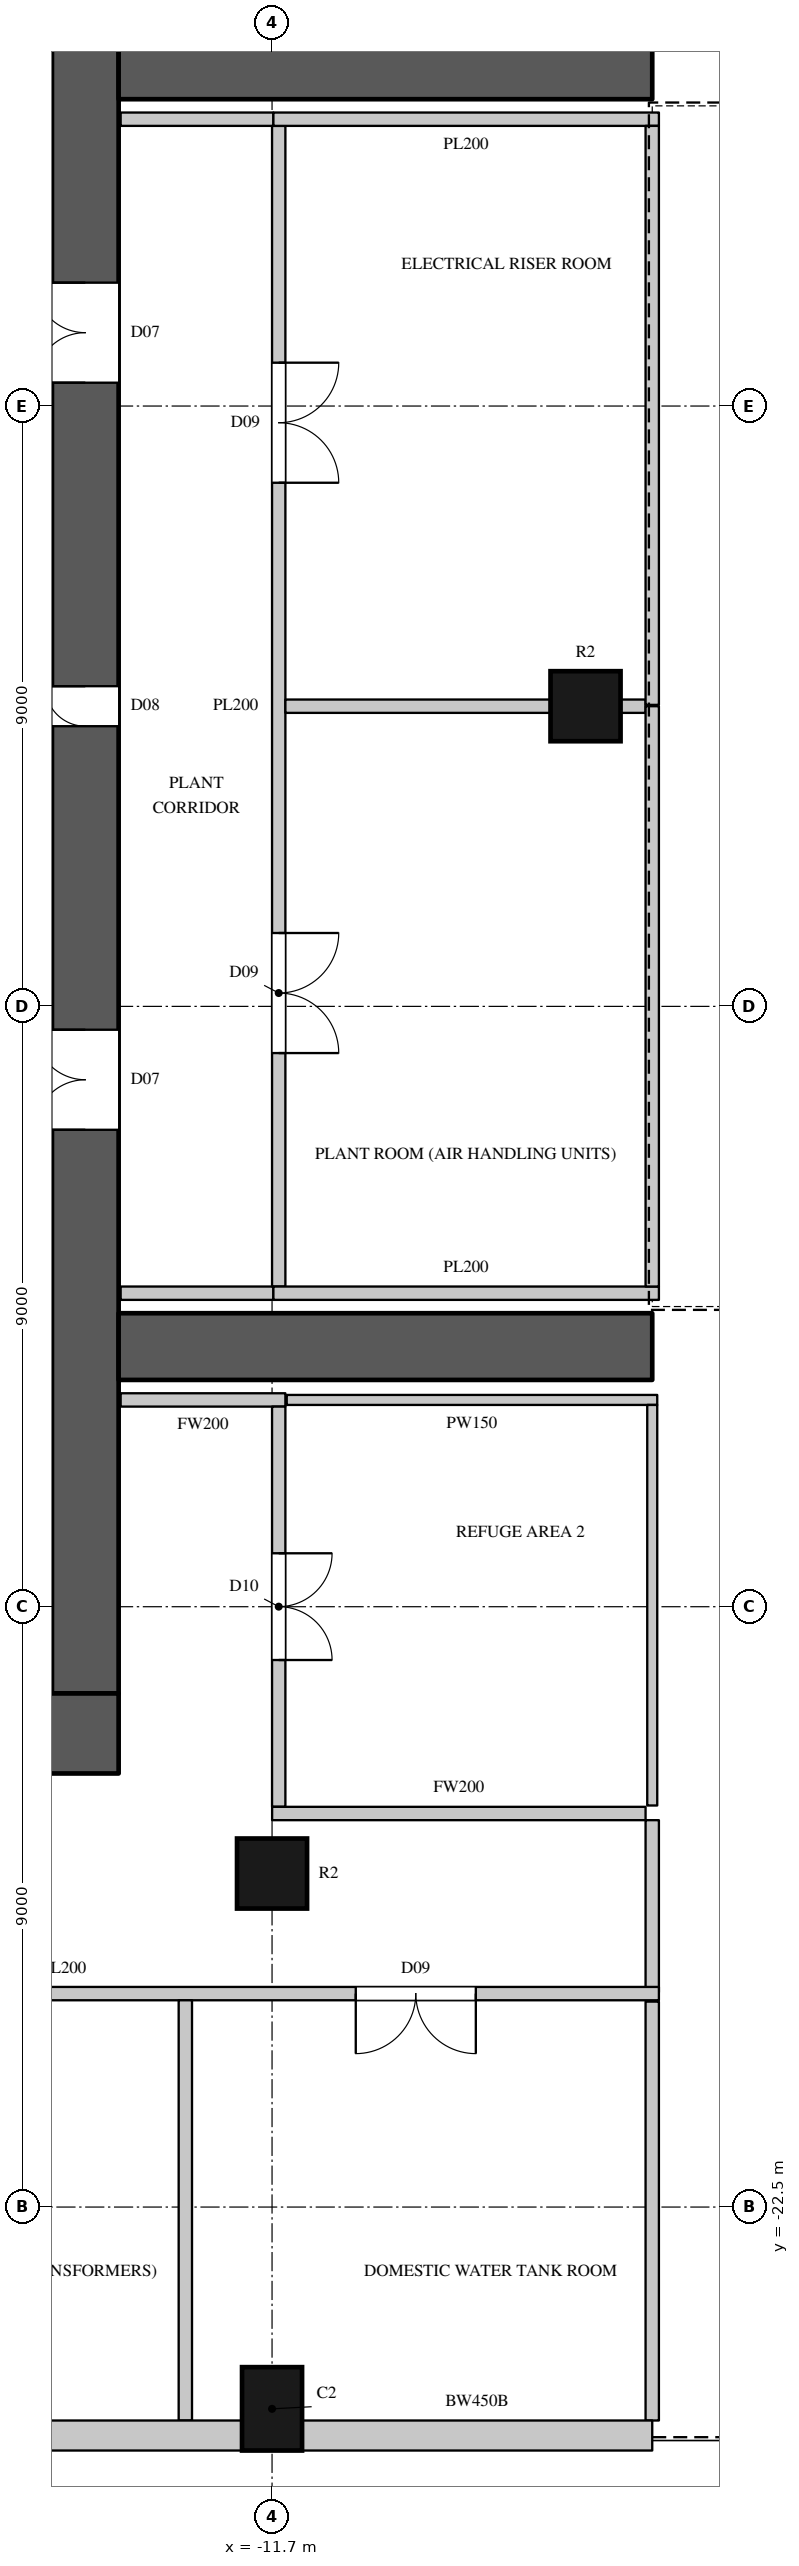
"""IFC4 building model, lengths in metres.
Left out: names, types, materials, properties, quantities, classifications, styles, units other than length and angle.
Written with IfcOpenShell. Run it as: python <this file> out.ifc"""

import sys

from ifc_helpers import new_model, si_unit, direction, frame, frame_2d, origin, origin_2d, place, context, subcontext, project, spatial, rectangle, circle, extrude, element, fill, save


model = new_model("IFC4")
c1 = context("Model", 3, precision=1e-05, world=origin(), true_north=direction((0.0, 1.0)))
c2 = subcontext(c1, "Body", "Model", "MODEL_VIEW")
j1 = project(units=[si_unit("LENGTHUNIT", "METRE"), si_unit("PLANEANGLEUNIT", "RADIAN")], contexts=[c1])
p1 = place(None, origin())
s1 = spatial("IfcSite", under=j1, at=p1, CompositionType="ELEMENT")
p2 = place(p1, origin())
s2 = spatial("IfcBuilding", under=s1, at=p2, CompositionType="ELEMENT")
p3 = place(p2, frame((0.0, 0.0, 152.5)))
s3 = spatial("IfcBuildingStorey", under=s2, at=p3, CompositionType="ELEMENT", Elevation=152.5)
p4 = place(p3, frame((-11.7, -25.525, 0.0), z_axis=(0.0, 0.0, 1.0), x_axis=(1.0, 0.0, 0.0)))
e1 = element("IfcColumn", 1, at=p4, inside=s3, PredefinedType="COLUMN", context=c2, shape_type="SweptSolid", body=[
    extrude(rectangle(XDim=0.9, YDim=1.25, at=origin_2d()), origin(), (0.0, 0.0, 1.0), 8.0),
])
for number, where, z_axis, x_axis in (
    (2, (-11.7, -17.5, 0.0), (0.0, 0.0, 1.0), (1.0, 0.0, 0.0)),
    (3, (-7.0, 0.0, 0.0), (0.0, 0.0, 1.0), (1.0, 0.0, 0.0)),
):
    element("IfcColumn", number, at=place(p3, frame(where, z_axis=z_axis, x_axis=x_axis)), inside=s3, PredefinedType="COLUMN", context=c2, shape_type="SweptSolid", body=[
        extrude(circle(Radius=0.525, at=origin_2d()), origin(), (0.0, 0.0, 1.0), 8.0),
    ])
for number, where, z_axis, x_axis in (
    (4, (-14.0, -9.6, 0.0), (0.0, 0.0, 1.0), (1.0, 0.0, 0.0)),
    (5, (-14.0, 9.6, 0.0), (0.0, 0.0, 1.0), (1.0, 0.0, 0.0)),
):
    element("IfcWall", number, at=place(p3, frame(where, z_axis=z_axis, x_axis=x_axis)), inside=s3, PredefinedType="SOLIDWALL", context=c2, shape_type="SweptSolid", body=[
        extrude(rectangle(XDim=8.0, YDim=1.0, at=frame_2d((4.0, 0.0))), origin(), (0.0, 0.0, 1.0), 7.7),
    ])
p5 = place(p3, frame((-20.25, -25.925, 0.0), z_axis=(0.0, 0.0, 1.0), x_axis=(1.0, 0.0, 0.0)))
e6 = element("IfcWall", 6, at=p5, inside=s3, PredefinedType="SOLIDWALL", context=c2, shape_type="SweptSolid", body=[
    extrude(rectangle(XDim=8.1, YDim=0.45, at=frame_2d((4.05, 0.0))), origin(), (0.0, 0.0, 1.0), 7.7),
])
p6 = place(p3, frame((-11.25, -25.925, 0.0), z_axis=(0.0, 0.0, 1.0), x_axis=(1.0, 0.0, 0.0)))
e7 = element("IfcWall", 7, at=p6, inside=s3, PredefinedType="SOLIDWALL", context=c2, shape_type="SweptSolid", body=[
    extrude(rectangle(XDim=5.25, YDim=0.45, at=frame_2d((2.625, 0.0))), origin(), (0.0, 0.0, 1.0), 4.7),
])
p7 = place(p3, frame((-30.0, -15.4, 0.0), z_axis=(0.0, 0.0, 1.0), x_axis=(1.0, 0.0, 0.0)))
e8 = element("IfcWall", 8, at=p7, inside=s3, PredefinedType="SHEAR", context=c2, shape_type="SweptSolid", body=[
    extrude(rectangle(XDim=16.0, YDim=1.2, at=frame_2d((8.0, 0.0))), origin(), (0.0, 0.0, 1.0), 8.0),
])
p8 = place(p7, frame((13.4, 0.0, 0.0)))
e9 = element("IfcOpeningElement", 9, at=p8, cuts=e8, PredefinedType="OPENING", context=c2, shape_type="SweptSolid", body=[
    extrude(rectangle(XDim=1.5, YDim=2.4, at=frame_2d((0.75, 1.2))), frame((0.0, 0.61, 0.0), z_axis=(0.0, -1.0, 0.0), x_axis=(1.0, 0.0, 0.0)), (0.0, 0.0, 1.0), 1.22),
])
p9 = place(p3, frame((-14.5, -14.8, 0.0), z_axis=(0.0, 0.0, 1.0), x_axis=(0.0, 1.0, 0.0)))
e10 = element("IfcWall", 10, at=p9, inside=s3, PredefinedType="SHEAR", context=c2, shape_type="SweptSolid", body=[
    extrude(rectangle(XDim=29.6, YDim=1.0, at=frame_2d((14.8, 0.0))), origin(), (0.0, 0.0, 1.0), 8.0),
])
p10 = place(p9, frame((8.45, 0.0, 0.0)))
e11 = element("IfcOpeningElement", 11, at=p10, cuts=e10, PredefinedType="OPENING", context=c2, shape_type="SweptSolid", body=[
    extrude(rectangle(XDim=1.5, YDim=2.4, at=frame_2d((0.75, 1.2))), frame((0.0, 0.51, 0.0), z_axis=(0.0, -1.0, 0.0), x_axis=(1.0, 0.0, 0.0)), (0.0, 0.0, 1.0), 1.02),
])
p11 = place(p9, frame((19.65, 0.0, 0.0)))
e12 = element("IfcOpeningElement", 12, at=p11, cuts=e10, PredefinedType="OPENING", context=c2, shape_type="SweptSolid", body=[
    extrude(rectangle(XDim=1.5, YDim=2.4, at=frame_2d((0.75, 1.2))), frame((0.0, 0.51, 0.0), z_axis=(0.0, -1.0, 0.0), x_axis=(1.0, 0.0, 0.0)), (0.0, 0.0, 1.0), 1.02),
])
p12 = place(p9, frame((14.5, 0.0, 0.0)))
e13 = element("IfcOpeningElement", 13, at=p12, cuts=e10, PredefinedType="OPENING", context=c2, shape_type="SweptSolid", body=[
    extrude(rectangle(XDim=0.6, YDim=2.0, at=frame_2d((0.3, 1.0))), frame((0.0, 0.51, 0.0), z_axis=(0.0, -1.0, 0.0), x_axis=(1.0, 0.0, 0.0)), (0.0, 0.0, 1.0), 1.02),
])
p13 = place(p3, frame((-13.97, -10.4, 0.0), z_axis=(0.0, 0.0, 1.0), x_axis=(1.0, 0.0, 0.0)))
e14 = element("IfcWall", 14, at=p13, inside=s3, PredefinedType="PARTITIONING", context=c2, shape_type="SweptSolid", body=[
    extrude(rectangle(XDim=2.47, YDim=0.2, at=frame_2d((1.235, 0.0))), origin(), (0.0, 0.0, 1.0), 7.7),
])
for number, where, z_axis, x_axis in (
    (15, (-13.97, -8.8, 0.0), (0.0, 0.0, 1.0), (1.0, 0.0, 0.0)),
    (16, (-13.97, 8.8, 0.0), (0.0, 0.0, 1.0), (1.0, 0.0, 0.0)),
):
    element("IfcWall", number, at=place(p3, frame(where, z_axis=z_axis, x_axis=x_axis)), inside=s3, PredefinedType="PARTITIONING", context=c2, shape_type="SweptSolid", body=[
        extrude(rectangle(XDim=2.29, YDim=0.2, at=frame_2d((1.145, 0.0))), origin(), (0.0, 0.0, 1.0), 7.7),
    ])
p14 = place(p3, frame((-11.6, -16.499, 0.0), z_axis=(0.0, 0.0, 1.0), x_axis=(0.0, 1.0, 0.0)))
e17 = element("IfcWall", 17, at=p14, inside=s3, PredefinedType="PARTITIONING", context=c2, shape_type="SweptSolid", body=[
    extrude(rectangle(XDim=5.999, YDim=0.2, at=frame_2d((3.0, 0.0))), origin(), (0.0, 0.0, 1.0), 6.4),
])
p15 = place(p14, frame((2.2, 0.0, 0.0)))
e18 = element("IfcOpeningElement", 18, at=p15, cuts=e17, PredefinedType="OPENING", context=c2, shape_type="SweptSolid", body=[
    extrude(rectangle(XDim=1.6, YDim=2.4, at=frame_2d((0.8, 1.2))), frame((0.0, 0.11, 0.0), z_axis=(0.0, -1.0, 0.0), x_axis=(1.0, 0.0, 0.0)), (0.0, 0.0, 1.0), 0.22),
])
p16 = place(p3, frame((-11.699, -16.6, 0.0), z_axis=(0.0, 0.0, 1.0), x_axis=(1.0, 0.0, 0.0)))
e19 = element("IfcWall", 19, at=p16, inside=s3, PredefinedType="PARTITIONING", context=c2, shape_type="SweptSolid", body=[
    extrude(rectangle(XDim=5.599, YDim=0.2, at=frame_2d((2.799, 0.0))), origin(), (0.0, 0.0, 1.0), 5.85),
])
p17 = place(p3, frame((-6.0, -19.28, 0.0), z_axis=(0.0, 0.0, 1.0), x_axis=(0.0, 1.0, 0.0)))
e20 = element("IfcWall", 20, at=p17, inside=s3, PredefinedType="PARTITIONING", context=c2, shape_type="SweptSolid", body=[
    extrude(rectangle(XDim=2.58, YDim=0.2, at=frame_2d((1.29, 0.0))), origin(), (0.0, 0.0, 1.0), 7.7),
])
p18 = place(p3, frame((-11.48, -10.4, 0.0), z_axis=(0.0, 0.0, 1.0), x_axis=(1.0, 0.0, 0.0)))
e21 = element("IfcWall", 21, at=p18, inside=s3, PredefinedType="PARTITIONING", context=c2, shape_type="SweptSolid", body=[
    extrude(rectangle(XDim=5.555, YDim=0.15, at=frame_2d((2.777, 0.0))), origin(), (0.0, 0.0, 1.0), 7.7),
])
p19 = place(p3, frame((-6.0, -16.48, 0.0), z_axis=(0.0, 0.0, 1.0), x_axis=(0.0, 1.0, 0.0)))
e22 = element("IfcWall", 22, at=p19, inside=s3, PredefinedType="PARTITIONING", context=c2, shape_type="SweptSolid", body=[
    extrude(rectangle(XDim=6.005, YDim=0.15, at=frame_2d((3.002, 0.0))), origin(), (0.0, 0.0, 1.0), 7.7),
])
p20 = place(p3, frame((-23.745, -19.3, 0.0), z_axis=(0.0, 0.0, 1.0), x_axis=(1.0, 0.0, 0.0)))
e23 = element("IfcWall", 23, at=p20, inside=s3, PredefinedType="PARTITIONING", context=c2, shape_type="SweptSolid", body=[
    extrude(rectangle(XDim=17.845, YDim=0.2, at=frame_2d((8.922, 0.0))), origin(), (0.0, 0.0, 1.0), 7.25),
])
p21 = place(p20, frame((1.0, 0.0, 0.0)))
e24 = element("IfcOpeningElement", 24, at=p21, cuts=e23, PredefinedType="OPENING", context=c2, shape_type="SweptSolid", body=[
    extrude(rectangle(XDim=1.8, YDim=2.4, at=frame_2d((0.9, 1.2))), frame((0.0, 0.11, 0.0), z_axis=(0.0, -1.0, 0.0), x_axis=(1.0, 0.0, 0.0)), (0.0, 0.0, 1.0), 0.22),
])
p22 = place(p20, frame((6.3, 0.0, 0.0)))
e25 = element("IfcOpeningElement", 25, at=p22, cuts=e23, PredefinedType="OPENING", context=c2, shape_type="SweptSolid", body=[
    extrude(rectangle(XDim=1.8, YDim=2.4, at=frame_2d((0.9, 1.2))), frame((0.0, 0.11, 0.0), z_axis=(0.0, -1.0, 0.0), x_axis=(1.0, 0.0, 0.0)), (0.0, 0.0, 1.0), 0.22),
])
p23 = place(p20, frame((13.3, 0.0, 0.0)))
e26 = element("IfcOpeningElement", 26, at=p23, cuts=e23, PredefinedType="OPENING", context=c2, shape_type="SweptSolid", body=[
    extrude(rectangle(XDim=1.8, YDim=2.4, at=frame_2d((0.9, 1.2))), frame((0.0, 0.11, 0.0), z_axis=(0.0, -1.0, 0.0), x_axis=(1.0, 0.0, 0.0)), (0.0, 0.0, 1.0), 0.22),
])
p24 = place(p3, frame((-13.0, -25.7, 0.0), z_axis=(0.0, 0.0, 1.0), x_axis=(0.0, 1.0, 0.0)))
e27 = element("IfcWall", 27, at=p24, inside=s3, PredefinedType="PARTITIONING", context=c2, shape_type="SweptSolid", body=[
    extrude(rectangle(XDim=6.3, YDim=0.2, at=frame_2d((3.15, 0.0))), origin(), (0.0, 0.0, 1.0), 7.7),
])
p25 = place(p3, frame((-11.6, -8.7, 0.0), z_axis=(0.0, 0.0, 1.0), x_axis=(0.0, 1.0, 0.0)))
e28 = element("IfcWall", 28, at=p25, inside=s3, PredefinedType="PARTITIONING", context=c2, shape_type="SweptSolid", body=[
    extrude(rectangle(XDim=17.4, YDim=0.2, at=frame_2d((8.7, 0.0))), origin(), (0.0, 0.0, 1.0), 7.15),
])
p26 = place(p25, frame((3.5, 0.0, 0.0)))
e29 = element("IfcOpeningElement", 29, at=p26, cuts=e28, PredefinedType="OPENING", context=c2, shape_type="SweptSolid", body=[
    extrude(rectangle(XDim=1.8, YDim=2.4, at=frame_2d((0.9, 1.2))), frame((0.0, 0.11, 0.0), z_axis=(0.0, -1.0, 0.0), x_axis=(1.0, 0.0, 0.0)), (0.0, 0.0, 1.0), 0.22),
])
p27 = place(p25, frame((12.05, 0.0, 0.0)))
e30 = element("IfcOpeningElement", 30, at=p27, cuts=e28, PredefinedType="OPENING", context=c2, shape_type="SweptSolid", body=[
    extrude(rectangle(XDim=1.8, YDim=2.4, at=frame_2d((0.9, 1.2))), frame((0.0, 0.11, 0.0), z_axis=(0.0, -1.0, 0.0), x_axis=(1.0, 0.0, 0.0)), (0.0, 0.0, 1.0), 0.22),
])
p28 = place(p3, frame((-11.5, 0.0, 0.0), z_axis=(0.0, 0.0, 1.0), x_axis=(1.0, 0.0, 0.0)))
e31 = element("IfcWall", 31, at=p28, inside=s3, PredefinedType="PARTITIONING", context=c2, shape_type="SweptSolid", body=[
    extrude(rectangle(XDim=3.975, YDim=0.2, at=frame_2d((1.988, 0.0))), origin(), (0.0, 0.0, 1.0), 7.7),
])
p29 = place(p3, frame((-6.475, 0.0, 0.0), z_axis=(0.0, 0.0, 1.0), x_axis=(1.0, 0.0, 0.0)))
e32 = element("IfcWall", 32, at=p29, inside=s3, PredefinedType="PARTITIONING", context=c2, shape_type="SweptSolid", body=[
    extrude(rectangle(XDim=0.375, YDim=0.2, at=frame_2d((0.188, 0.0))), origin(), (0.0, 0.0, 1.0), 7.7),
])
for number, where, z_axis, x_axis in (
    (33, (-11.68, -8.8, 0.0), (0.0, 0.0, 1.0), (1.0, 0.0, 0.0)),
    (34, (-11.68, 8.8, 0.0), (0.0, 0.0, 1.0), (1.0, 0.0, 0.0)),
):
    element("IfcWall", number, at=place(p3, frame(where, z_axis=z_axis, x_axis=x_axis)), inside=s3, PredefinedType="PARTITIONING", context=c2, shape_type="SweptSolid", body=[
        extrude(rectangle(XDim=5.78, YDim=0.2, at=frame_2d((2.89, 0.0))), origin(), (0.0, 0.0, 1.0), 7.7),
    ])
p30 = place(p3, frame((-6.0, -25.7, 0.0), z_axis=(0.0, 0.0, 1.0), x_axis=(0.0, 1.0, 0.0)))
e35 = element("IfcWall", 35, at=p30, inside=s3, PredefinedType="PARTITIONING", context=c2, shape_type="SweptSolid", body=[
    extrude(rectangle(XDim=6.28, YDim=0.2, at=frame_2d((3.14, 0.0))), origin(), (0.0, 0.0, 1.0), 7.7),
])
p31 = place(p3, frame((-6.0, -8.7, 0.0), z_axis=(0.0, 0.0, 1.0), x_axis=(0.0, 1.0, 0.0)))
e36 = element("IfcWall", 36, at=p31, inside=s3, PredefinedType="PARTITIONING", context=c2, shape_type="SweptSolid", body=[
    extrude(rectangle(XDim=8.7, YDim=0.2, at=frame_2d((4.35, 0.0))), origin(), (0.0, 0.0, 1.0), 7.7),
])
p32 = place(p3, frame((-6.0, 0.02, 0.0), z_axis=(0.0, 0.0, 1.0), x_axis=(0.0, 1.0, 0.0)))
e37 = element("IfcWall", 37, at=p32, inside=s3, PredefinedType="PARTITIONING", context=c2, shape_type="SweptSolid", body=[
    extrude(rectangle(XDim=8.68, YDim=0.2, at=frame_2d((4.34, 0.0))), origin(), (0.0, 0.0, 1.0), 7.7),
])
p33 = place(p26, origin())
e38 = element("IfcDoor", 38, at=p33, inside=s3, OperationType="DOUBLE_DOOR_SINGLE_SWING", PredefinedType="DOOR", context=c2, shape_type="SweptSolid", body=[
    extrude(rectangle(XDim=1.8, YDim=2.4, at=frame_2d((0.9, 1.2))), frame((0.0, 0.025, 0.0), z_axis=(0.0, -1.0, 0.0), x_axis=(1.0, 0.0, 0.0)), (0.0, 0.0, 1.0), 0.05),
])
fill(e29, e38)
p34 = place(p27, origin())
e39 = element("IfcDoor", 39, at=p34, inside=s3, OperationType="DOUBLE_DOOR_SINGLE_SWING", PredefinedType="DOOR", context=c2, shape_type="SweptSolid", body=[
    extrude(rectangle(XDim=1.8, YDim=2.4, at=frame_2d((0.9, 1.2))), frame((0.0, 0.025, 0.0), z_axis=(0.0, -1.0, 0.0), x_axis=(1.0, 0.0, 0.0)), (0.0, 0.0, 1.0), 0.05),
])
fill(e30, e39)
p35 = place(p23, origin())
e40 = element("IfcDoor", 40, at=p35, inside=s3, OperationType="DOUBLE_DOOR_SINGLE_SWING", PredefinedType="DOOR", context=c2, shape_type="SweptSolid", body=[
    extrude(rectangle(XDim=1.8, YDim=2.4, at=frame_2d((0.9, 1.2))), frame((0.0, 0.025, 0.0), z_axis=(0.0, -1.0, 0.0), x_axis=(1.0, 0.0, 0.0)), (0.0, 0.0, 1.0), 0.05),
])
fill(e26, e40)
p36 = place(p15, origin())
e41 = element("IfcDoor", 41, at=p36, inside=s3, OperationType="DOUBLE_DOOR_SINGLE_SWING", PredefinedType="DOOR", context=c2, shape_type="SweptSolid", body=[
    extrude(rectangle(XDim=1.6, YDim=2.4, at=frame_2d((0.8, 1.2))), frame((0.0, 0.025, 0.0), z_axis=(0.0, -1.0, 0.0), x_axis=(1.0, 0.0, 0.0)), (0.0, 0.0, 1.0), 0.05),
])
fill(e18, e41)
p37 = place(p10, origin())
e42 = element("IfcDoor", 42, at=p37, inside=s3, OperationType="DOUBLE_DOOR_SINGLE_SWING", PredefinedType="DOOR", context=c2, shape_type="SweptSolid", body=[
    extrude(rectangle(XDim=1.5, YDim=2.4, at=frame_2d((0.75, 1.2))), frame((0.0, 0.495, 0.0), z_axis=(0.0, -1.0, 0.0), x_axis=(1.0, 0.0, 0.0)), (0.0, 0.0, 1.0), 0.05),
])
fill(e11, e42)
p38 = place(p11, origin())
e43 = element("IfcDoor", 43, at=p38, inside=s3, OperationType="DOUBLE_DOOR_SINGLE_SWING", PredefinedType="DOOR", context=c2, shape_type="SweptSolid", body=[
    extrude(rectangle(XDim=1.5, YDim=2.4, at=frame_2d((0.75, 1.2))), frame((0.0, 0.495, 0.0), z_axis=(0.0, -1.0, 0.0), x_axis=(1.0, 0.0, 0.0)), (0.0, 0.0, 1.0), 0.05),
])
fill(e12, e43)
p39 = place(p12, origin())
e44 = element("IfcDoor", 44, at=p39, inside=s3, OperationType="SINGLE_SWING_RIGHT", PredefinedType="DOOR", context=c2, shape_type="SweptSolid", body=[
    extrude(rectangle(XDim=0.6, YDim=2.0, at=frame_2d((0.3, 1.0))), frame((0.0, 0.495, 0.0), z_axis=(0.0, -1.0, 0.0), x_axis=(1.0, 0.0, 0.0)), (0.0, 0.0, 1.0), 0.05),
])
fill(e13, e44)
save(model, sys.argv[1])
